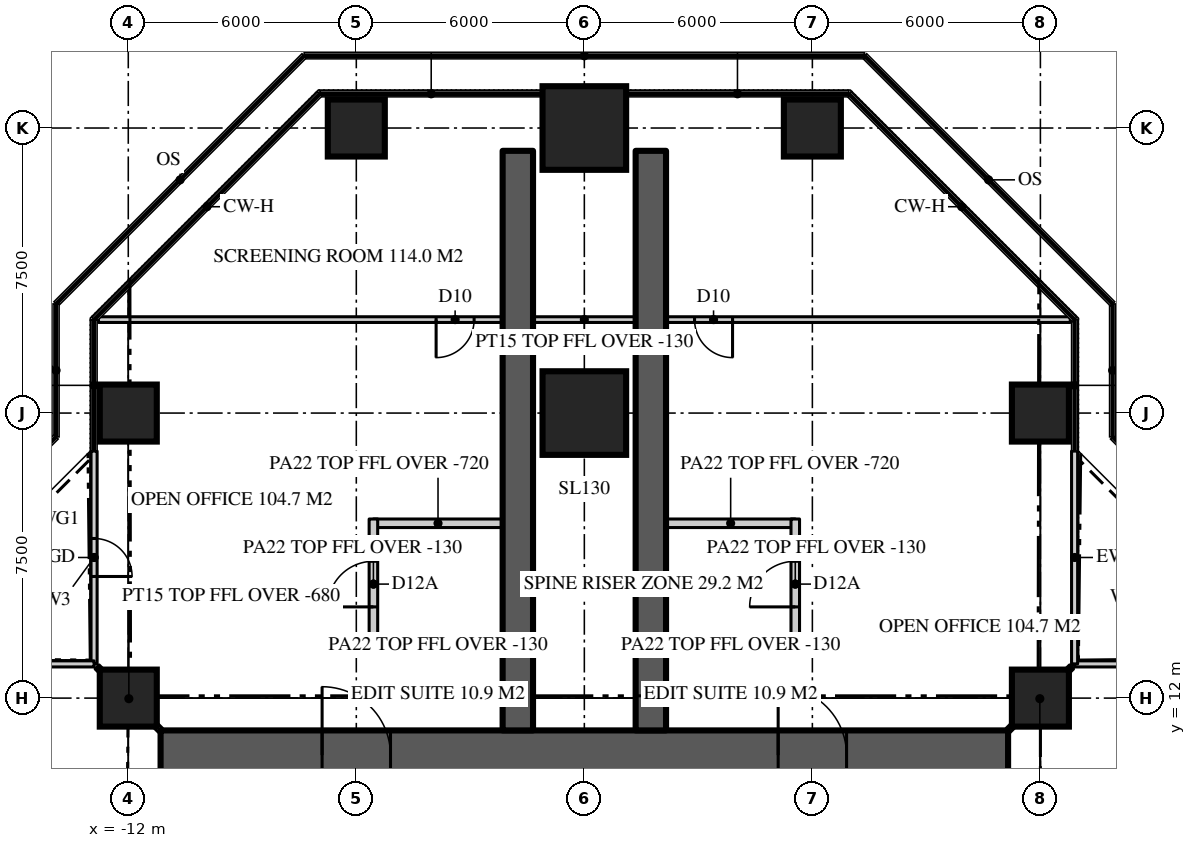
"""IFC4 building model, lengths in metres.
Left out: names, types, materials, properties, quantities, classifications, styles, units other than length and angle.
Written with IfcOpenShell. Run it as: python <this file> out.ifc"""

import sys

from ifc_helpers import new_model, si_unit, direction, frame, frame_2d, origin, origin_2d, place, context, subcontext, project, spatial, rectangle, extrude, element, fill, save


model = new_model("IFC4")
c1 = context("Model", 3, precision=1e-05, world=origin(), true_north=direction((0.0, 1.0)))
c2 = subcontext(c1, "Body", "Model", "MODEL_VIEW")
j1 = project(units=[si_unit("LENGTHUNIT", "METRE"), si_unit("PLANEANGLEUNIT", "RADIAN")], contexts=[c1])
p1 = place(None, origin())
s1 = spatial("IfcSite", under=j1, at=p1, CompositionType="ELEMENT")
p2 = place(p1, origin())
s2 = spatial("IfcBuilding", under=s1, at=p2, CompositionType="ELEMENT")
p3 = place(p2, frame((0.0, 0.0, 236.1)))
s3 = spatial("IfcBuildingStorey", under=s2, at=p3, CompositionType="ELEMENT", Elevation=236.1)
p4 = place(p3, frame((-11.15, 10.5, 0.0), z_axis=(0.0, 0.0, 1.0), x_axis=(1.0, 0.0, 0.0)))
e1 = element("IfcWall", 1, at=p4, inside=s3, PredefinedType="SHEAR", context=c2, shape_type="SweptSolid", body=[
    extrude(rectangle(XDim=22.3, YDim=1.3, at=frame_2d((11.15, 0.0))), origin(), (0.0, 0.0, 1.0), 3.9),
])
p5 = place(p4, frame((4.25, 0.0, 0.0)))
e2 = element("IfcOpeningElement", 2, at=p5, cuts=e1, PredefinedType="OPENING", context=c2, shape_type="SweptSolid", body=[
    extrude(rectangle(XDim=1.8, YDim=2.2, at=frame_2d((0.9, 1.1))), frame((0.0, 0.66, 0.0), z_axis=(0.0, -1.0, 0.0), x_axis=(1.0, 0.0, 0.0)), (0.0, 0.0, 1.0), 1.32),
])
p6 = place(p4, frame((16.25, 0.0, 0.0)))
e3 = element("IfcOpeningElement", 3, at=p6, cuts=e1, PredefinedType="OPENING", context=c2, shape_type="SweptSolid", body=[
    extrude(rectangle(XDim=1.8, YDim=2.2, at=frame_2d((0.9, 1.1))), frame((0.0, 0.66, 0.0), z_axis=(0.0, -1.0, 0.0), x_axis=(1.0, 0.0, 0.0)), (0.0, 0.0, 1.0), 1.32),
])
for number, where, z_axis, x_axis in (
    (4, (1.75, 11.15, 0.0), (0.0, 0.0, 1.0), (0.0, 1.0, 0.0)),
    (5, (-1.75, 11.15, 0.0), (0.0, 0.0, 1.0), (0.0, 1.0, 0.0)),
):
    element("IfcWall", number, at=place(p3, frame(where, z_axis=z_axis, x_axis=x_axis)), inside=s3, PredefinedType="SHEAR", context=c2, shape_type="SweptSolid", body=[
        extrude(rectangle(XDim=15.25, YDim=0.8, at=frame_2d((7.625, 0.0))), origin(), (0.0, 0.0, 1.0), 3.9),
    ])
for number, where, z_axis, x_axis in (
    (6, (-12.0, 12.0, 0.0), (0.0, 0.0, 1.0), (1.0, 0.0, 0.0)),
    (7, (12.0, 12.0, 0.0), (0.0, 0.0, 1.0), (1.0, 0.0, 0.0)),
    (8, (-12.0, 19.5, 0.0), (0.0, 0.0, 1.0), (1.0, 0.0, 0.0)),
):
    element("IfcColumn", number, at=place(p3, frame(where, z_axis=z_axis, x_axis=x_axis)), inside=s3, PredefinedType="COLUMN", context=c2, shape_type="SweptSolid", body=[
        extrude(rectangle(XDim=1.5, YDim=1.5, at=origin_2d()), origin(), (0.0, 0.0, 1.0), 3.9),
    ])
p7 = place(p3, frame((0.0, 19.5, 0.0), z_axis=(0.0, 0.0, 1.0), x_axis=(1.0, 0.0, 0.0)))
e9 = element("IfcColumn", 9, at=p7, inside=s3, PredefinedType="COLUMN", context=c2, shape_type="SweptSolid", body=[
    extrude(rectangle(XDim=2.2, YDim=2.2, at=origin_2d()), origin(), (0.0, 0.0, 1.0), 3.9),
])
for number, where, z_axis, x_axis in (
    (10, (12.0, 19.5, 0.0), (0.0, 0.0, 1.0), (1.0, 0.0, 0.0)),
    (11, (-6.0, 27.0, 0.0), (0.0, 0.0, 1.0), (1.0, 0.0, 0.0)),
):
    element("IfcColumn", number, at=place(p3, frame(where, z_axis=z_axis, x_axis=x_axis)), inside=s3, PredefinedType="COLUMN", context=c2, shape_type="SweptSolid", body=[
        extrude(rectangle(XDim=1.5, YDim=1.5, at=origin_2d()), origin(), (0.0, 0.0, 1.0), 3.9),
    ])
p8 = place(p3, frame((0.0, 27.0, 0.0), z_axis=(0.0, 0.0, 1.0), x_axis=(1.0, 0.0, 0.0)))
e12 = element("IfcColumn", 12, at=p8, inside=s3, PredefinedType="COLUMN", context=c2, shape_type="SweptSolid", body=[
    extrude(rectangle(XDim=2.2, YDim=2.2, at=origin_2d()), origin(), (0.0, 0.0, 1.0), 3.9),
])
p9 = place(p3, frame((6.0, 27.0, 0.0), z_axis=(0.0, 0.0, 1.0), x_axis=(1.0, 0.0, 0.0)))
e13 = element("IfcColumn", 13, at=p9, inside=s3, PredefinedType="COLUMN", context=c2, shape_type="SweptSolid", body=[
    extrude(rectangle(XDim=1.5, YDim=1.5, at=origin_2d()), origin(), (0.0, 0.0, 1.0), 3.9),
])
p10 = place(p3, frame((18.5, 12.9, 0.0), z_axis=(0.0, 0.0, 1.0), x_axis=(-1.0, 0.0, 0.0)))
e14 = element("IfcWall", 14, at=p10, inside=s3, PredefinedType="SOLIDWALL", context=c2, shape_type="SweptSolid", body=[
    extrude(rectangle(XDim=5.6, YDim=0.16, at=frame_2d((2.8, 0.0))), origin(), (0.0, 0.0, 1.0), 3.77),
])
p11 = place(p10, frame((2.3, 0.0, 0.0)))
e15 = element("IfcOpeningElement", 15, at=p11, cuts=e14, PredefinedType="OPENING", context=c2, shape_type="SweptSolid", body=[
    extrude(rectangle(XDim=1.0, YDim=2.2, at=frame_2d((0.5, 1.1))), frame((0.0, 0.09, 0.0), z_axis=(0.0, -1.0, 0.0), x_axis=(1.0, 0.0, 0.0)), (0.0, 0.0, 1.0), 0.18),
])
p12 = place(p3, frame((12.9, 12.9, 0.0), z_axis=(0.0, 0.0, 1.0), x_axis=(0.0, 1.0, 0.0)))
e16 = element("IfcWall", 16, at=p12, inside=s3, PredefinedType="SOLIDWALL", context=c2, shape_type="SweptSolid", body=[
    extrude(rectangle(XDim=5.6, YDim=0.16, at=frame_2d((2.8, 0.0))), origin(), (0.0, 0.0, 1.0), 3.77),
])
p13 = place(p3, frame((-12.9, 18.5, 0.0), z_axis=(0.0, 0.0, 1.0), x_axis=(0.0, -1.0, 0.0)))
e17 = element("IfcWall", 17, at=p13, inside=s3, PredefinedType="SOLIDWALL", context=c2, shape_type="SweptSolid", body=[
    extrude(rectangle(XDim=5.6, YDim=0.16, at=frame_2d((2.8, 0.0))), origin(), (0.0, 0.0, 1.0), 3.77),
])
p14 = place(p13, frame((2.3, 0.0, 0.0)))
e18 = element("IfcOpeningElement", 18, at=p14, cuts=e17, PredefinedType="OPENING", context=c2, shape_type="SweptSolid", body=[
    extrude(rectangle(XDim=1.0, YDim=2.2, at=frame_2d((0.5, 1.1))), frame((0.0, 0.09, 0.0), z_axis=(0.0, -1.0, 0.0), x_axis=(1.0, 0.0, 0.0)), (0.0, 0.0, 1.0), 0.18),
])
p15 = place(p3, frame((-12.9, 12.9, 0.0), z_axis=(0.0, 0.0, 1.0), x_axis=(-1.0, 0.0, 0.0)))
e19 = element("IfcWall", 19, at=p15, inside=s3, PredefinedType="SOLIDWALL", context=c2, shape_type="SweptSolid", body=[
    extrude(rectangle(XDim=5.6, YDim=0.16, at=frame_2d((2.8, 0.0))), origin(), (0.0, 0.0, 1.0), 3.77),
])
p16 = place(p3, frame((12.786, 21.959, 0.0), z_axis=(0.0, 0.0, 1.0), x_axis=(-1.0, 0.0, 0.0)))
e20 = element("IfcWall", 20, at=p16, inside=s3, PredefinedType="PARTITIONING", context=c2, shape_type="SweptSolid", body=[
    extrude(rectangle(XDim=25.573, YDim=0.15, at=frame_2d((12.786, 0.0))), origin(), (0.0, 0.0, 1.0), 3.77),
])
p17 = place(p16, frame((15.687, 0.0, 0.0)))
e21 = element("IfcOpeningElement", 21, at=p17, cuts=e20, PredefinedType="OPENING", context=c2, shape_type="SweptSolid", body=[
    extrude(rectangle(XDim=1.0, YDim=2.2, at=frame_2d((0.5, 1.1))), frame((0.0, 0.085, 0.0), z_axis=(0.0, -1.0, 0.0), x_axis=(1.0, 0.0, 0.0)), (0.0, 0.0, 1.0), 0.17),
])
p18 = place(p16, frame((8.886, 0.0, 0.0)))
e22 = element("IfcOpeningElement", 22, at=p18, cuts=e20, PredefinedType="OPENING", context=c2, shape_type="SweptSolid", body=[
    extrude(rectangle(XDim=1.0, YDim=2.2, at=frame_2d((0.5, 1.1))), frame((0.0, 0.085, 0.0), z_axis=(0.0, -1.0, 0.0), x_axis=(1.0, 0.0, 0.0)), (0.0, 0.0, 1.0), 0.17),
])
p19 = place(p3, frame((-2.15, 13.4, 0.0), z_axis=(0.0, 0.0, 1.0), x_axis=(-1.0, 0.0, 0.0)))
e23 = element("IfcWall", 23, at=p19, inside=s3, PredefinedType="PARTITIONING", context=c2, shape_type="SweptSolid", body=[
    extrude(rectangle(XDim=3.4, YDim=0.225, at=frame_2d((1.7, 0.0))), origin(), (0.0, 0.0, 1.0), 3.77),
])
p20 = place(p3, frame((-2.15, 16.6, 0.0), z_axis=(0.0, 0.0, 1.0), x_axis=(-1.0, 0.0, 0.0)))
e24 = element("IfcWall", 24, at=p20, inside=s3, PredefinedType="PARTITIONING", context=c2, shape_type="SweptSolid", body=[
    extrude(rectangle(XDim=3.4, YDim=0.225, at=frame_2d((1.7, 0.0))), origin(), (0.0, 0.0, 1.0), 3.18),
])
p21 = place(p3, frame((-5.55, 13.288, 0.0), z_axis=(0.0, 0.0, 1.0), x_axis=(0.0, 1.0, 0.0)))
e25 = element("IfcWall", 25, at=p21, inside=s3, PredefinedType="PARTITIONING", context=c2, shape_type="SweptSolid", body=[
    extrude(rectangle(XDim=3.425, YDim=0.225, at=frame_2d((1.712, 0.0))), origin(), (0.0, 0.0, 1.0), 3.77),
])
p22 = place(p21, frame((1.113, 0.0, 0.0)))
e26 = element("IfcOpeningElement", 26, at=p22, cuts=e25, PredefinedType="OPENING", context=c2, shape_type="SweptSolid", body=[
    extrude(rectangle(XDim=1.2, YDim=2.2, at=frame_2d((0.6, 1.1))), frame((0.0, 0.123, 0.0), z_axis=(0.0, -1.0, 0.0), x_axis=(1.0, 0.0, 0.0)), (0.0, 0.0, 1.0), 0.245),
])
p23 = place(p3, frame((2.15, 13.4, 0.0), z_axis=(0.0, 0.0, 1.0), x_axis=(1.0, 0.0, 0.0)))
e27 = element("IfcWall", 27, at=p23, inside=s3, PredefinedType="PARTITIONING", context=c2, shape_type="SweptSolid", body=[
    extrude(rectangle(XDim=3.4, YDim=0.225, at=frame_2d((1.7, 0.0))), origin(), (0.0, 0.0, 1.0), 3.77),
])
p24 = place(p3, frame((2.15, 16.6, 0.0), z_axis=(0.0, 0.0, 1.0), x_axis=(1.0, 0.0, 0.0)))
e28 = element("IfcWall", 28, at=p24, inside=s3, PredefinedType="PARTITIONING", context=c2, shape_type="SweptSolid", body=[
    extrude(rectangle(XDim=3.4, YDim=0.225, at=frame_2d((1.7, 0.0))), origin(), (0.0, 0.0, 1.0), 3.18),
])
p25 = place(p3, frame((5.55, 13.288, 0.0), z_axis=(0.0, 0.0, 1.0), x_axis=(0.0, 1.0, 0.0)))
e29 = element("IfcWall", 29, at=p25, inside=s3, PredefinedType="PARTITIONING", context=c2, shape_type="SweptSolid", body=[
    extrude(rectangle(XDim=3.425, YDim=0.225, at=frame_2d((1.712, 0.0))), origin(), (0.0, 0.0, 1.0), 3.77),
])
p26 = place(p25, frame((1.113, 0.0, 0.0)))
e30 = element("IfcOpeningElement", 30, at=p26, cuts=e29, PredefinedType="OPENING", context=c2, shape_type="SweptSolid", body=[
    extrude(rectangle(XDim=1.2, YDim=2.2, at=frame_2d((0.6, 1.1))), frame((0.0, 0.123, 0.0), z_axis=(0.0, -1.0, 0.0), x_axis=(1.0, 0.0, 0.0)), (0.0, 0.0, 1.0), 0.245),
])
for number, where, z_axis, x_axis in (
    (31, (11.15, 11.15, 0.0), (0.0, 0.0, 1.0), (0.707, 0.707, 0.0)),
    (32, (-11.15, 11.15, 0.0), (0.0, 0.0, 1.0), (-0.707, 0.707, 0.0)),
):
    element("IfcWall", number, at=place(p3, frame(where, z_axis=z_axis, x_axis=x_axis)), inside=s3, PredefinedType="PARTITIONING", context=c2, shape_type="SweptSolid", body=[
        extrude(rectangle(XDim=2.362, YDim=0.15, at=frame_2d((1.181, 0.0))), origin(), (0.0, 0.0, 1.0), 3.22),
    ])
p27 = place(p14, origin())
e33 = element("IfcDoor", 33, at=p27, inside=s3, OperationType="SINGLE_SWING_RIGHT", PredefinedType="DOOR", context=c2, shape_type="SweptSolid", body=[
    extrude(rectangle(XDim=1.0, YDim=2.2, at=frame_2d((0.5, 1.1))), frame((0.0, 0.025, 0.0), z_axis=(0.0, -1.0, 0.0), x_axis=(1.0, 0.0, 0.0)), (0.0, 0.0, 1.0), 0.05),
])
fill(e18, e33)
p28 = place(p5, origin())
e34 = element("IfcDoor", 34, at=p28, inside=s3, OperationType="DOUBLE_DOOR_DOUBLE_SWING", PredefinedType="DOOR", context=c2, shape_type="SweptSolid", body=[
    extrude(rectangle(XDim=1.8, YDim=2.2, at=frame_2d((0.9, 1.1))), frame((0.0, 0.025, 0.0), z_axis=(0.0, -1.0, 0.0), x_axis=(1.0, 0.0, 0.0)), (0.0, 0.0, 1.0), 0.05),
])
fill(e2, e34)
p29 = place(p6, origin())
e35 = element("IfcDoor", 35, at=p29, inside=s3, OperationType="DOUBLE_DOOR_DOUBLE_SWING", PredefinedType="DOOR", context=c2, shape_type="SweptSolid", body=[
    extrude(rectangle(XDim=1.8, YDim=2.2, at=frame_2d((0.9, 1.1))), frame((0.0, 0.025, 0.0), z_axis=(0.0, -1.0, 0.0), x_axis=(1.0, 0.0, 0.0)), (0.0, 0.0, 1.0), 0.05),
])
fill(e3, e35)
p30 = place(p17, origin())
e36 = element("IfcDoor", 36, at=p30, inside=s3, OperationType="SINGLE_SWING_RIGHT", PredefinedType="DOOR", context=c2, shape_type="SweptSolid", body=[
    extrude(rectangle(XDim=1.0, YDim=2.2, at=frame_2d((0.5, 1.1))), frame((0.0, 0.025, 0.0), z_axis=(0.0, -1.0, 0.0), x_axis=(1.0, 0.0, 0.0)), (0.0, 0.0, 1.0), 0.05),
])
fill(e21, e36)
p31 = place(p18, origin())
e37 = element("IfcDoor", 37, at=p31, inside=s3, OperationType="SINGLE_SWING_LEFT", PredefinedType="DOOR", context=c2, shape_type="SweptSolid", body=[
    extrude(rectangle(XDim=1.0, YDim=2.2, at=frame_2d((0.5, 1.1))), frame((0.0, 0.025, 0.0), z_axis=(0.0, -1.0, 0.0), x_axis=(1.0, 0.0, 0.0)), (0.0, 0.0, 1.0), 0.05),
])
fill(e22, e37)
p32 = place(p22, origin())
e38 = element("IfcDoor", 38, at=p32, inside=s3, OperationType="SINGLE_SWING_LEFT", PredefinedType="DOOR", context=c2, shape_type="SweptSolid", body=[
    extrude(rectangle(XDim=1.2, YDim=2.2, at=frame_2d((0.6, 1.1))), frame((0.0, 0.025, 0.0), z_axis=(0.0, -1.0, 0.0), x_axis=(1.0, 0.0, 0.0)), (0.0, 0.0, 1.0), 0.05),
])
fill(e26, e38)
p33 = place(p26, origin())
e39 = element("IfcDoor", 39, at=p33, inside=s3, OperationType="SINGLE_SWING_LEFT", PredefinedType="DOOR", context=c2, shape_type="SweptSolid", body=[
    extrude(rectangle(XDim=1.2, YDim=2.2, at=frame_2d((0.6, 1.1))), frame((0.0, 0.025, 0.0), z_axis=(0.0, -1.0, 0.0), x_axis=(1.0, 0.0, 0.0)), (0.0, 0.0, 1.0), 0.05),
])
fill(e30, e39)
save(model, sys.argv[1])
